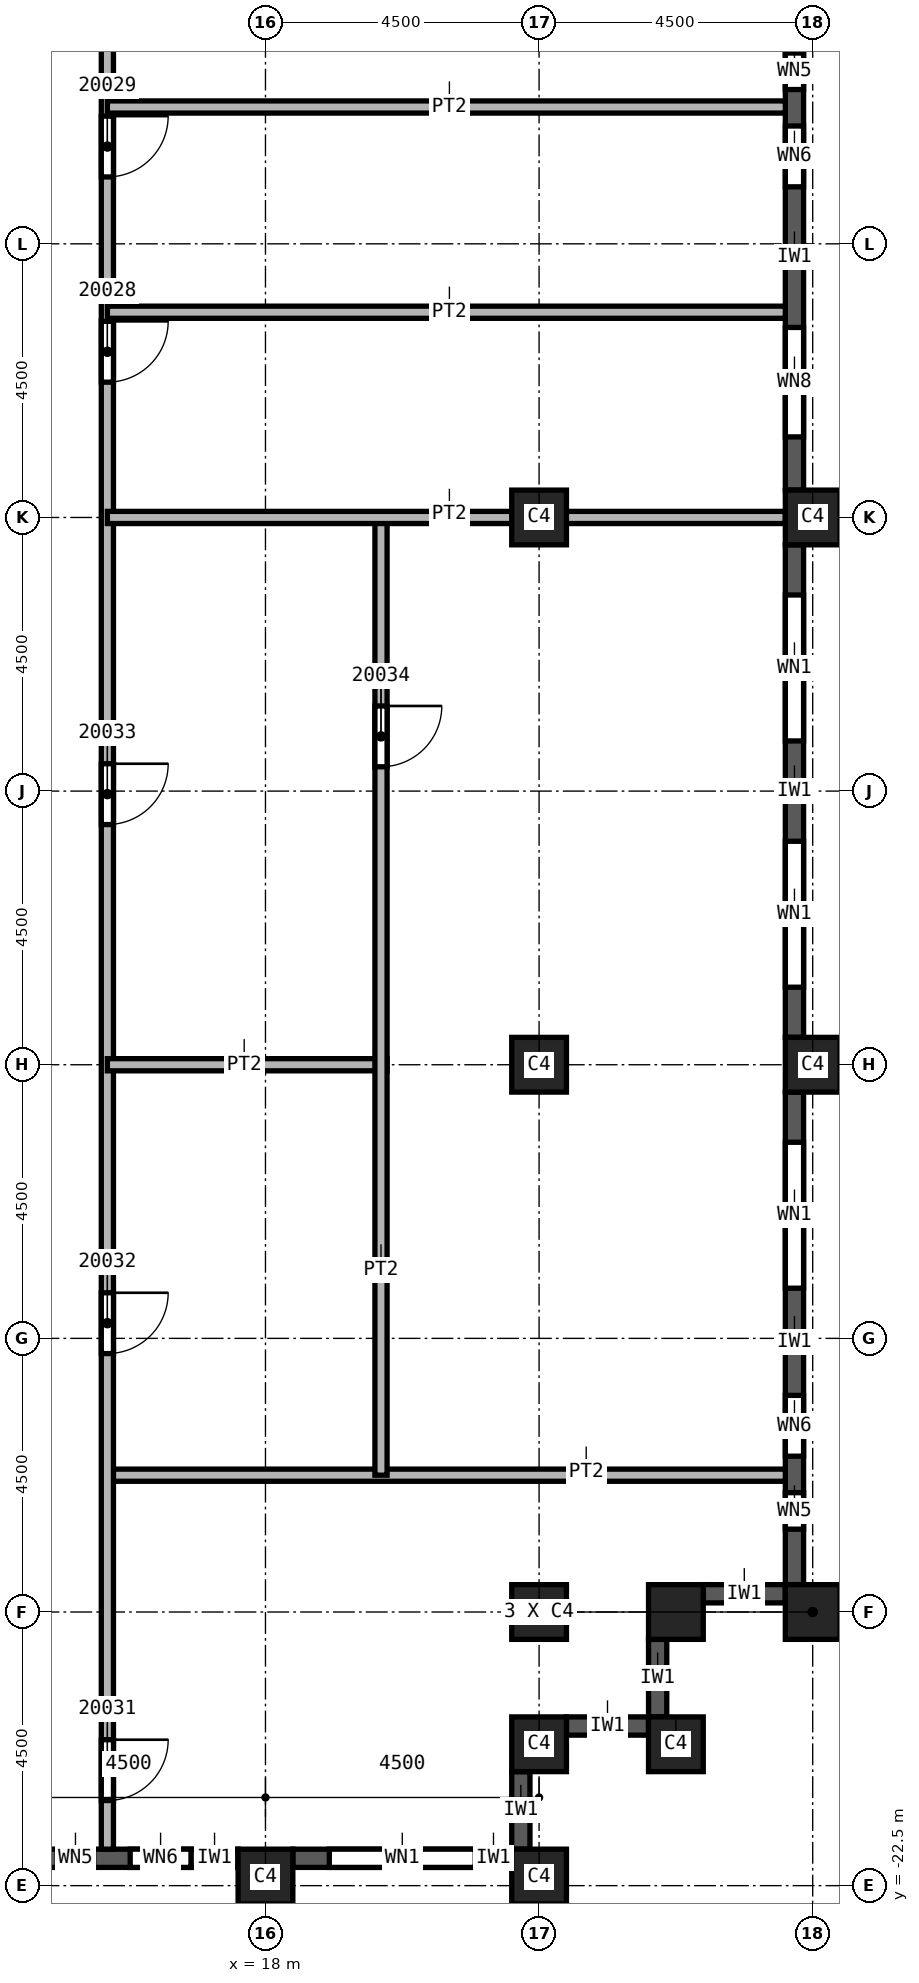
"""IFC4 building model, lengths in metres.
Left out: names, types, materials, properties, quantities, classifications, styles, units other than length and angle.
Written with IfcOpenShell. Run it as: python <this file> out.ifc"""

import sys

from ifc_helpers import new_model, si_unit, direction, frame, frame_2d, origin, origin_2d, place, context, subcontext, project, spatial, rectangle, extrude, element, fill, save


model = new_model("IFC4")
c1 = context("Model", 3, precision=1e-05, world=origin(), true_north=direction((0.0, 1.0)))
c2 = subcontext(c1, "Body", "Model", "MODEL_VIEW")
j1 = project(units=[si_unit("LENGTHUNIT", "METRE"), si_unit("PLANEANGLEUNIT", "RADIAN")], contexts=[c1])
p1 = place(None, origin())
s1 = spatial("IfcSite", under=j1, at=p1, CompositionType="ELEMENT")
p2 = place(p1, origin())
s2 = spatial("IfcBuilding", under=s1, at=p2, CompositionType="ELEMENT")
p3 = place(p2, frame((0.0, 0.0, 290.0)))
s3 = spatial("IfcBuildingStorey", under=s2, at=p3, CompositionType="ELEMENT", Elevation=290.0)
for number, where, z_axis, x_axis in (
    (1, (22.5, 0.0, 0.0), (0.0, 0.0, 1.0), (1.0, 0.0, 0.0)),
    (2, (22.5, -9.0, 0.0), (0.0, 0.0, 1.0), (1.0, 0.0, 0.0)),
    (3, (22.5, -18.0, 0.0), (0.0, 0.0, 1.0), (1.0, 0.0, 0.0)),
    (4, (27.0, 0.0, 0.0), (0.0, 0.0, 1.0), (0.0, 1.0, 0.0)),
    (5, (27.0, -9.0, 0.0), (0.0, 0.0, 1.0), (0.0, 1.0, 0.0)),
    (6, (27.0, -18.0, 0.0), (0.0, 0.0, 1.0), (0.0, 1.0, 0.0)),
    (7, (18.0, -22.35, 0.0), (0.0, 0.0, 1.0), (1.0, 0.0, 0.0)),
    (8, (22.5, -22.35, 0.0), (0.0, 0.0, 1.0), (1.0, 0.0, 0.0)),
    (9, (22.5, -20.175, 0.0), (0.0, 0.0, 1.0), (1.0, 0.0, 0.0)),
    (10, (24.75, -20.175, 0.0), (0.0, 0.0, 1.0), (1.0, 0.0, 0.0)),
    (11, (24.75, -18.0, 0.0), (0.0, 0.0, 1.0), (1.0, 0.0, 0.0)),
):
    element("IfcColumn", number, at=place(p3, frame(where, z_axis=z_axis, x_axis=x_axis)), inside=s3, PredefinedType="COLUMN", context=c2, shape_type="SweptSolid", body=[
        extrude(rectangle(XDim=0.9, YDim=0.9, at=origin_2d()), origin(), (0.0, 0.0, 1.0), 3.59),
    ])
p4 = place(p3, frame((13.95, -22.05, 0.0), z_axis=(0.0, 0.0, 1.0), x_axis=(1.0, 0.0, 0.0)))
e12 = element("IfcWall", 12, at=p4, inside=s3, PredefinedType="SOLIDWALL", context=c2, shape_type="SweptSolid", body=[
    extrude(rectangle(XDim=3.6, YDim=0.3, at=frame_2d((1.8, 0.0))), origin(), (0.0, 0.0, 1.0), 2.99),
])
p5 = place(p4, frame((0.625, 0.0, 0.8)))
e13 = element("IfcOpeningElement", 13, at=p5, cuts=e12, PredefinedType="OPENING", context=c2, shape_type="SweptSolid", body=[
    extrude(rectangle(XDim=0.6, YDim=1.95, at=frame_2d((0.3, 0.975))), frame((0.0, 0.15, 0.0), z_axis=(0.0, -1.0, 0.0), x_axis=(1.0, 0.0, 0.0)), (0.0, 0.0, 1.0), 0.3),
])
p6 = place(p4, frame((1.825, 0.0, 0.8)))
e14 = element("IfcOpeningElement", 14, at=p6, cuts=e12, PredefinedType="OPENING", context=c2, shape_type="SweptSolid", body=[
    extrude(rectangle(XDim=1.0, YDim=1.95, at=frame_2d((0.5, 0.975))), frame((0.0, 0.15, 0.0), z_axis=(0.0, -1.0, 0.0), x_axis=(1.0, 0.0, 0.0)), (0.0, 0.0, 1.0), 0.3),
])
p7 = place(p3, frame((18.45, -22.05, 0.0), z_axis=(0.0, 0.0, 1.0), x_axis=(1.0, 0.0, 0.0)))
e15 = element("IfcWall", 15, at=p7, inside=s3, PredefinedType="SOLIDWALL", context=c2, shape_type="SweptSolid", body=[
    extrude(rectangle(XDim=3.6, YDim=0.3, at=frame_2d((1.8, 0.0))), origin(), (0.0, 0.0, 1.0), 2.99),
])
p8 = place(p7, frame((0.6, 0.0, 0.8)))
e16 = element("IfcOpeningElement", 16, at=p8, cuts=e15, PredefinedType="OPENING", context=c2, shape_type="SweptSolid", body=[
    extrude(rectangle(XDim=2.4, YDim=1.95, at=frame_2d((1.2, 0.975))), frame((0.0, 0.15, 0.0), z_axis=(0.0, -1.0, 0.0), x_axis=(1.0, 0.0, 0.0)), (0.0, 0.0, 1.0), 0.3),
])
p9 = place(p3, frame((22.2, -21.9, 0.0), z_axis=(0.0, 0.0, 1.0), x_axis=(0.0, 1.0, 0.0)))
e17 = element("IfcWall", 17, at=p9, inside=s3, PredefinedType="SOLIDWALL", context=c2, shape_type="SweptSolid", body=[
    extrude(rectangle(XDim=1.275, YDim=0.3, at=frame_2d((0.637, 0.0))), origin(), (0.0, 0.0, 1.0), 2.99),
])
p10 = place(p3, frame((22.95, -19.875, 0.0), z_axis=(0.0, 0.0, 1.0), x_axis=(1.0, 0.0, 0.0)))
e18 = element("IfcWall", 18, at=p10, inside=s3, PredefinedType="SOLIDWALL", context=c2, shape_type="SweptSolid", body=[
    extrude(rectangle(XDim=1.35, YDim=0.3, at=frame_2d((0.675, 0.0))), origin(), (0.0, 0.0, 1.0), 2.99),
])
p11 = place(p3, frame((24.45, -19.725, 0.0), z_axis=(0.0, 0.0, 1.0), x_axis=(0.0, 1.0, 0.0)))
e19 = element("IfcWall", 19, at=p11, inside=s3, PredefinedType="SOLIDWALL", context=c2, shape_type="SweptSolid", body=[
    extrude(rectangle(XDim=1.275, YDim=0.3, at=frame_2d((0.638, 0.0))), origin(), (0.0, 0.0, 1.0), 2.99),
])
p12 = place(p3, frame((25.2, -17.7, 0.0), z_axis=(0.0, 0.0, 1.0), x_axis=(1.0, 0.0, 0.0)))
e20 = element("IfcWall", 20, at=p12, inside=s3, PredefinedType="SOLIDWALL", context=c2, shape_type="SweptSolid", body=[
    extrude(rectangle(XDim=1.35, YDim=0.3, at=frame_2d((0.675, 0.0))), origin(), (0.0, 0.0, 1.0), 2.99),
])
p13 = place(p3, frame((26.7, -17.55, 0.0), z_axis=(0.0, 0.0, 1.0), x_axis=(0.0, 1.0, 0.0)))
e21 = element("IfcWall", 21, at=p13, inside=s3, PredefinedType="SOLIDWALL", context=c2, shape_type="SweptSolid", body=[
    extrude(rectangle(XDim=8.1, YDim=0.3, at=frame_2d((4.05, 0.0))), origin(), (0.0, 0.0, 1.0), 2.99),
])
p14 = place(p13, frame((4.875, 0.0, 0.8)))
e22 = element("IfcOpeningElement", 22, at=p14, cuts=e21, PredefinedType="OPENING", context=c2, shape_type="SweptSolid", body=[
    extrude(rectangle(XDim=2.4, YDim=1.95, at=frame_2d((1.2, 0.975))), frame((0.0, 0.15, 0.0), z_axis=(0.0, -1.0, 0.0), x_axis=(1.0, 0.0, 0.0)), (0.0, 0.0, 1.0), 0.3),
])
p15 = place(p13, frame((0.913, 0.0, 0.8)))
e23 = element("IfcOpeningElement", 23, at=p15, cuts=e21, PredefinedType="OPENING", context=c2, shape_type="SweptSolid", body=[
    extrude(rectangle(XDim=0.6, YDim=1.95, at=frame_2d((0.3, 0.975))), frame((0.0, 0.15, 0.0), z_axis=(0.0, -1.0, 0.0), x_axis=(1.0, 0.0, 0.0)), (0.0, 0.0, 1.0), 0.3),
])
p16 = place(p13, frame((2.113, 0.0, 0.8)))
e24 = element("IfcOpeningElement", 24, at=p16, cuts=e21, PredefinedType="OPENING", context=c2, shape_type="SweptSolid", body=[
    extrude(rectangle(XDim=1.0, YDim=1.95, at=frame_2d((0.5, 0.975))), frame((0.0, 0.15, 0.0), z_axis=(0.0, -1.0, 0.0), x_axis=(1.0, 0.0, 0.0)), (0.0, 0.0, 1.0), 0.3),
])
p17 = place(p3, frame((26.7, -8.55, 0.0), z_axis=(0.0, 0.0, 1.0), x_axis=(0.0, 1.0, 0.0)))
e25 = element("IfcWall", 25, at=p17, inside=s3, PredefinedType="SOLIDWALL", context=c2, shape_type="SweptSolid", body=[
    extrude(rectangle(XDim=8.1, YDim=0.3, at=frame_2d((4.05, 0.0))), origin(), (0.0, 0.0, 1.0), 2.99),
])
p18 = place(p17, frame((0.825, 0.0, 0.8)))
e26 = element("IfcOpeningElement", 26, at=p18, cuts=e25, PredefinedType="OPENING", context=c2, shape_type="SweptSolid", body=[
    extrude(rectangle(XDim=2.4, YDim=1.95, at=frame_2d((1.2, 0.975))), frame((0.0, 0.15, 0.0), z_axis=(0.0, -1.0, 0.0), x_axis=(1.0, 0.0, 0.0)), (0.0, 0.0, 1.0), 0.3),
])
p19 = place(p17, frame((4.875, 0.0, 0.8)))
e27 = element("IfcOpeningElement", 27, at=p19, cuts=e25, PredefinedType="OPENING", context=c2, shape_type="SweptSolid", body=[
    extrude(rectangle(XDim=2.4, YDim=1.95, at=frame_2d((1.2, 0.975))), frame((0.0, 0.15, 0.0), z_axis=(0.0, -1.0, 0.0), x_axis=(1.0, 0.0, 0.0)), (0.0, 0.0, 1.0), 0.3),
])
p20 = place(p3, frame((26.7, 0.45, 0.0), z_axis=(0.0, 0.0, 1.0), x_axis=(0.0, 1.0, 0.0)))
e28 = element("IfcWall", 28, at=p20, inside=s3, PredefinedType="SOLIDWALL", context=c2, shape_type="SweptSolid", body=[
    extrude(rectangle(XDim=8.1, YDim=0.3, at=frame_2d((4.05, 0.0))), origin(), (0.0, 0.0, 1.0), 2.99),
])
p21 = place(p20, frame((0.875, 0.0, 0.8)))
e29 = element("IfcOpeningElement", 29, at=p21, cuts=e28, PredefinedType="OPENING", context=c2, shape_type="SweptSolid", body=[
    extrude(rectangle(XDim=1.8, YDim=1.95, at=frame_2d((0.9, 0.975))), frame((0.0, 0.15, 0.0), z_axis=(0.0, -1.0, 0.0), x_axis=(1.0, 0.0, 0.0)), (0.0, 0.0, 1.0), 0.3),
])
p22 = place(p20, frame((4.988, 0.0, 0.8)))
e30 = element("IfcOpeningElement", 30, at=p22, cuts=e28, PredefinedType="OPENING", context=c2, shape_type="SweptSolid", body=[
    extrude(rectangle(XDim=1.0, YDim=1.95, at=frame_2d((0.5, 0.975))), frame((0.0, 0.15, 0.0), z_axis=(0.0, -1.0, 0.0), x_axis=(1.0, 0.0, 0.0)), (0.0, 0.0, 1.0), 0.3),
])
p23 = place(p20, frame((6.587, 0.0, 0.8)))
e31 = element("IfcOpeningElement", 31, at=p23, cuts=e28, PredefinedType="OPENING", context=c2, shape_type="SweptSolid", body=[
    extrude(rectangle(XDim=0.6, YDim=1.95, at=frame_2d((0.3, 0.975))), frame((0.0, 0.15, 0.0), z_axis=(0.0, -1.0, 0.0), x_axis=(1.0, 0.0, 0.0)), (0.0, 0.0, 1.0), 0.3),
])
p24 = place(p3, frame((15.4, -15.75, 0.0), z_axis=(0.0, 0.0, 1.0), x_axis=(1.0, 0.0, 0.0)))
e32 = element("IfcWall", 32, at=p24, inside=s3, PredefinedType="PARTITIONING", context=c2, shape_type="SweptSolid", body=[
    extrude(rectangle(XDim=11.15, YDim=0.2, at=frame_2d((5.575, 0.0))), origin(), (0.0, 0.0, 1.0), 3.59),
])
p25 = place(p3, frame((15.4, 21.9, 0.0), z_axis=(0.0, 0.0, 1.0), x_axis=(0.0, -1.0, 0.0)))
e33 = element("IfcWall", 33, at=p25, inside=s3, PredefinedType="PARTITIONING", context=c2, shape_type="SweptSolid", body=[
    extrude(rectangle(XDim=43.8, YDim=0.2, at=frame_2d((21.9, 0.0))), origin(), (0.0, 0.0, 1.0), 3.59),
])
p26 = place(p25, frame((18.675, 0.0, 0.0)))
e34 = element("IfcOpeningElement", 34, at=p26, cuts=e33, PredefinedType="OPENING", context=c2, shape_type="SweptSolid", body=[
    extrude(rectangle(XDim=1.0, YDim=2.1, at=frame_2d((0.5, 1.05))), frame((0.0, 0.1, 0.0), z_axis=(0.0, -1.0, 0.0), x_axis=(1.0, 0.0, 0.0)), (0.0, 0.0, 1.0), 0.2),
])
p27 = place(p25, frame((15.3, 0.0, 0.0)))
e35 = element("IfcOpeningElement", 35, at=p27, cuts=e33, PredefinedType="OPENING", context=c2, shape_type="SweptSolid", body=[
    extrude(rectangle(XDim=1.0, YDim=2.1, at=frame_2d((0.5, 1.05))), frame((0.0, 0.1, 0.0), z_axis=(0.0, -1.0, 0.0), x_axis=(1.0, 0.0, 0.0)), (0.0, 0.0, 1.0), 0.2),
])
p28 = place(p25, frame((9.85, 0.0, 0.0)))
e36 = element("IfcOpeningElement", 36, at=p28, cuts=e33, PredefinedType="OPENING", context=c2, shape_type="SweptSolid", body=[
    extrude(rectangle(XDim=1.0, YDim=2.1, at=frame_2d((0.5, 1.05))), frame((0.0, 0.1, 0.0), z_axis=(0.0, -1.0, 0.0), x_axis=(1.0, 0.0, 0.0)), (0.0, 0.0, 1.0), 0.2),
])
p29 = place(p25, frame((42.0, 0.0, 0.0)))
e37 = element("IfcOpeningElement", 37, at=p29, cuts=e33, PredefinedType="OPENING", context=c2, shape_type="SweptSolid", body=[
    extrude(rectangle(XDim=1.0, YDim=2.1, at=frame_2d((0.5, 1.05))), frame((0.0, 0.1, 0.0), z_axis=(0.0, -1.0, 0.0), x_axis=(1.0, 0.0, 0.0)), (0.0, 0.0, 1.0), 0.2),
])
p30 = place(p25, frame((34.65, 0.0, 0.0)))
e38 = element("IfcOpeningElement", 38, at=p30, cuts=e33, PredefinedType="OPENING", context=c2, shape_type="SweptSolid", body=[
    extrude(rectangle(XDim=1.0, YDim=2.1, at=frame_2d((0.5, 1.05))), frame((0.0, 0.1, 0.0), z_axis=(0.0, -1.0, 0.0), x_axis=(1.0, 0.0, 0.0)), (0.0, 0.0, 1.0), 0.2),
])
p31 = place(p25, frame((25.95, 0.0, 0.0)))
e39 = element("IfcOpeningElement", 39, at=p31, cuts=e33, PredefinedType="OPENING", context=c2, shape_type="SweptSolid", body=[
    extrude(rectangle(XDim=1.0, YDim=2.1, at=frame_2d((0.5, 1.05))), frame((0.0, 0.1, 0.0), z_axis=(0.0, -1.0, 0.0), x_axis=(1.0, 0.0, 0.0)), (0.0, 0.0, 1.0), 0.2),
])
p32 = place(p3, frame((15.4, -9.0, 0.0), z_axis=(0.0, 0.0, 1.0), x_axis=(1.0, 0.0, 0.0)))
e40 = element("IfcWall", 40, at=p32, inside=s3, PredefinedType="PARTITIONING", context=c2, shape_type="SweptSolid", body=[
    extrude(rectangle(XDim=4.6, YDim=0.2, at=frame_2d((2.3, 0.0))), origin(), (0.0, 0.0, 1.0), 3.59),
])
for number, where, z_axis, x_axis in (
    (41, (15.4, 3.375, 0.0), (0.0, 0.0, 1.0), (1.0, 0.0, 0.0)),
    (42, (15.4, 6.75, 0.0), (0.0, 0.0, 1.0), (1.0, 0.0, 0.0)),
):
    element("IfcWall", number, at=place(p3, frame(where, z_axis=z_axis, x_axis=x_axis)), inside=s3, PredefinedType="PARTITIONING", context=c2, shape_type="SweptSolid", body=[
        extrude(rectangle(XDim=11.15, YDim=0.2, at=frame_2d((5.575, 0.0))), origin(), (0.0, 0.0, 1.0), 3.59),
    ])
p33 = place(p3, frame((19.9, 0.0, 0.0), z_axis=(0.0, 0.0, 1.0), x_axis=(0.0, -1.0, 0.0)))
e43 = element("IfcWall", 43, at=p33, inside=s3, PredefinedType="PARTITIONING", context=c2, shape_type="SweptSolid", body=[
    extrude(rectangle(XDim=15.75, YDim=0.2, at=frame_2d((7.875, 0.0))), origin(), (0.0, 0.0, 1.0), 3.59),
])
p34 = place(p33, frame((3.1, 0.0, 0.0)))
e44 = element("IfcOpeningElement", 44, at=p34, cuts=e43, PredefinedType="OPENING", context=c2, shape_type="SweptSolid", body=[
    extrude(rectangle(XDim=1.0, YDim=2.1, at=frame_2d((0.5, 1.05))), frame((0.0, 0.1, 0.0), z_axis=(0.0, -1.0, 0.0), x_axis=(1.0, 0.0, 0.0)), (0.0, 0.0, 1.0), 0.2),
])
p35 = place(p3, frame((26.55, 0.0, 0.0), z_axis=(0.0, 0.0, 1.0), x_axis=(-1.0, 0.0, 0.0)))
e45 = element("IfcWall", 45, at=p35, inside=s3, PredefinedType="PARTITIONING", context=c2, shape_type="SweptSolid", body=[
    extrude(rectangle(XDim=11.15, YDim=0.2, at=frame_2d((5.575, 0.0))), origin(), (0.0, 0.0, 1.0), 3.59),
])
p36 = place(p8, origin())
e46 = element("IfcWindow", 46, at=p36, inside=s3, PartitioningType="SINGLE_PANEL", PredefinedType="WINDOW", context=c2, shape_type="SweptSolid", body=[
    extrude(rectangle(XDim=2.4, YDim=1.95, at=frame_2d((1.2, 0.975))), frame((0.0, 0.03, 0.0), z_axis=(0.0, -1.0, 0.0), x_axis=(1.0, 0.0, 0.0)), (0.0, 0.0, 1.0), 0.06),
])
fill(e16, e46)
p37 = place(p14, origin())
e47 = element("IfcWindow", 47, at=p37, inside=s3, PartitioningType="SINGLE_PANEL", PredefinedType="WINDOW", context=c2, shape_type="SweptSolid", body=[
    extrude(rectangle(XDim=2.4, YDim=1.95, at=frame_2d((1.2, 0.975))), frame((0.0, 0.03, 0.0), z_axis=(0.0, -1.0, 0.0), x_axis=(1.0, 0.0, 0.0)), (0.0, 0.0, 1.0), 0.06),
])
fill(e22, e47)
p38 = place(p18, origin())
e48 = element("IfcWindow", 48, at=p38, inside=s3, PartitioningType="SINGLE_PANEL", PredefinedType="WINDOW", context=c2, shape_type="SweptSolid", body=[
    extrude(rectangle(XDim=2.4, YDim=1.95, at=frame_2d((1.2, 0.975))), frame((0.0, 0.03, 0.0), z_axis=(0.0, -1.0, 0.0), x_axis=(1.0, 0.0, 0.0)), (0.0, 0.0, 1.0), 0.06),
])
fill(e26, e48)
p39 = place(p19, origin())
e49 = element("IfcWindow", 49, at=p39, inside=s3, PartitioningType="SINGLE_PANEL", PredefinedType="WINDOW", context=c2, shape_type="SweptSolid", body=[
    extrude(rectangle(XDim=2.4, YDim=1.95, at=frame_2d((1.2, 0.975))), frame((0.0, 0.03, 0.0), z_axis=(0.0, -1.0, 0.0), x_axis=(1.0, 0.0, 0.0)), (0.0, 0.0, 1.0), 0.06),
])
fill(e27, e49)
p40 = place(p26, origin())
e50 = element("IfcDoor", 50, at=p40, inside=s3, OperationType="SINGLE_SWING_LEFT", PredefinedType="DOOR", context=c2, shape_type="SweptSolid", body=[
    extrude(rectangle(XDim=1.0, YDim=2.1, at=frame_2d((0.5, 1.05))), frame((0.0, 0.025, 0.0), z_axis=(0.0, -1.0, 0.0), x_axis=(1.0, 0.0, 0.0)), (0.0, 0.0, 1.0), 0.05),
])
fill(e34, e50)
p41 = place(p27, origin())
e51 = element("IfcDoor", 51, at=p41, inside=s3, OperationType="SINGLE_SWING_RIGHT", PredefinedType="DOOR", context=c2, shape_type="SweptSolid", body=[
    extrude(rectangle(XDim=1.0, YDim=2.1, at=frame_2d((0.5, 1.05))), frame((0.0, 0.025, 0.0), z_axis=(0.0, -1.0, 0.0), x_axis=(1.0, 0.0, 0.0)), (0.0, 0.0, 1.0), 0.05),
])
fill(e35, e51)
p42 = place(p29, origin())
e52 = element("IfcDoor", 52, at=p42, inside=s3, OperationType="SINGLE_SWING_RIGHT", PredefinedType="DOOR", context=c2, shape_type="SweptSolid", body=[
    extrude(rectangle(XDim=1.0, YDim=2.1, at=frame_2d((0.5, 1.05))), frame((0.0, 0.025, 0.0), z_axis=(0.0, -1.0, 0.0), x_axis=(1.0, 0.0, 0.0)), (0.0, 0.0, 1.0), 0.05),
])
fill(e37, e52)
p43 = place(p30, origin())
e53 = element("IfcDoor", 53, at=p43, inside=s3, OperationType="SINGLE_SWING_LEFT", PredefinedType="DOOR", context=c2, shape_type="SweptSolid", body=[
    extrude(rectangle(XDim=1.0, YDim=2.1, at=frame_2d((0.5, 1.05))), frame((0.0, 0.025, 0.0), z_axis=(0.0, -1.0, 0.0), x_axis=(1.0, 0.0, 0.0)), (0.0, 0.0, 1.0), 0.05),
])
fill(e38, e53)
p44 = place(p31, origin())
e54 = element("IfcDoor", 54, at=p44, inside=s3, OperationType="SINGLE_SWING_RIGHT", PredefinedType="DOOR", context=c2, shape_type="SweptSolid", body=[
    extrude(rectangle(XDim=1.0, YDim=2.1, at=frame_2d((0.5, 1.05))), frame((0.0, 0.025, 0.0), z_axis=(0.0, -1.0, 0.0), x_axis=(1.0, 0.0, 0.0)), (0.0, 0.0, 1.0), 0.05),
])
fill(e39, e54)
p45 = place(p34, origin())
e55 = element("IfcDoor", 55, at=p45, inside=s3, OperationType="SINGLE_SWING_LEFT", PredefinedType="DOOR", context=c2, shape_type="SweptSolid", body=[
    extrude(rectangle(XDim=1.0, YDim=2.1, at=frame_2d((0.5, 1.05))), frame((0.0, 0.025, 0.0), z_axis=(0.0, -1.0, 0.0), x_axis=(1.0, 0.0, 0.0)), (0.0, 0.0, 1.0), 0.05),
])
fill(e44, e55)
p46 = place(p5, origin())
e56 = element("IfcWindow", 56, at=p46, inside=s3, PartitioningType="SINGLE_PANEL", PredefinedType="WINDOW", context=c2, shape_type="SweptSolid", body=[
    extrude(rectangle(XDim=0.6, YDim=1.95, at=frame_2d((0.3, 0.975))), frame((0.0, 0.03, 0.0), z_axis=(0.0, -1.0, 0.0), x_axis=(1.0, 0.0, 0.0)), (0.0, 0.0, 1.0), 0.06),
])
fill(e13, e56)
p47 = place(p6, origin())
e57 = element("IfcWindow", 57, at=p47, inside=s3, PartitioningType="SINGLE_PANEL", PredefinedType="WINDOW", context=c2, shape_type="SweptSolid", body=[
    extrude(rectangle(XDim=1.0, YDim=1.95, at=frame_2d((0.5, 0.975))), frame((0.0, 0.03, 0.0), z_axis=(0.0, -1.0, 0.0), x_axis=(1.0, 0.0, 0.0)), (0.0, 0.0, 1.0), 0.06),
])
fill(e14, e57)
p48 = place(p15, origin())
e58 = element("IfcWindow", 58, at=p48, inside=s3, PartitioningType="SINGLE_PANEL", PredefinedType="WINDOW", context=c2, shape_type="SweptSolid", body=[
    extrude(rectangle(XDim=0.6, YDim=1.95, at=frame_2d((0.3, 0.975))), frame((0.0, 0.03, 0.0), z_axis=(0.0, -1.0, 0.0), x_axis=(1.0, 0.0, 0.0)), (0.0, 0.0, 1.0), 0.06),
])
fill(e23, e58)
p49 = place(p16, origin())
e59 = element("IfcWindow", 59, at=p49, inside=s3, PartitioningType="SINGLE_PANEL", PredefinedType="WINDOW", context=c2, shape_type="SweptSolid", body=[
    extrude(rectangle(XDim=1.0, YDim=1.95, at=frame_2d((0.5, 0.975))), frame((0.0, 0.03, 0.0), z_axis=(0.0, -1.0, 0.0), x_axis=(1.0, 0.0, 0.0)), (0.0, 0.0, 1.0), 0.06),
])
fill(e24, e59)
p50 = place(p21, origin())
e60 = element("IfcWindow", 60, at=p50, inside=s3, PartitioningType="SINGLE_PANEL", PredefinedType="WINDOW", context=c2, shape_type="SweptSolid", body=[
    extrude(rectangle(XDim=1.8, YDim=1.95, at=frame_2d((0.9, 0.975))), frame((0.0, 0.03, 0.0), z_axis=(0.0, -1.0, 0.0), x_axis=(1.0, 0.0, 0.0)), (0.0, 0.0, 1.0), 0.06),
])
fill(e29, e60)
p51 = place(p22, origin())
e61 = element("IfcWindow", 61, at=p51, inside=s3, PartitioningType="SINGLE_PANEL", PredefinedType="WINDOW", context=c2, shape_type="SweptSolid", body=[
    extrude(rectangle(XDim=1.0, YDim=1.95, at=frame_2d((0.5, 0.975))), frame((0.0, 0.03, 0.0), z_axis=(0.0, -1.0, 0.0), x_axis=(1.0, 0.0, 0.0)), (0.0, 0.0, 1.0), 0.06),
])
fill(e30, e61)
p52 = place(p23, origin())
e62 = element("IfcWindow", 62, at=p52, inside=s3, PartitioningType="SINGLE_PANEL", PredefinedType="WINDOW", context=c2, shape_type="SweptSolid", body=[
    extrude(rectangle(XDim=0.6, YDim=1.95, at=frame_2d((0.3, 0.975))), frame((0.0, 0.03, 0.0), z_axis=(0.0, -1.0, 0.0), x_axis=(1.0, 0.0, 0.0)), (0.0, 0.0, 1.0), 0.06),
])
fill(e31, e62)
save(model, sys.argv[1])
